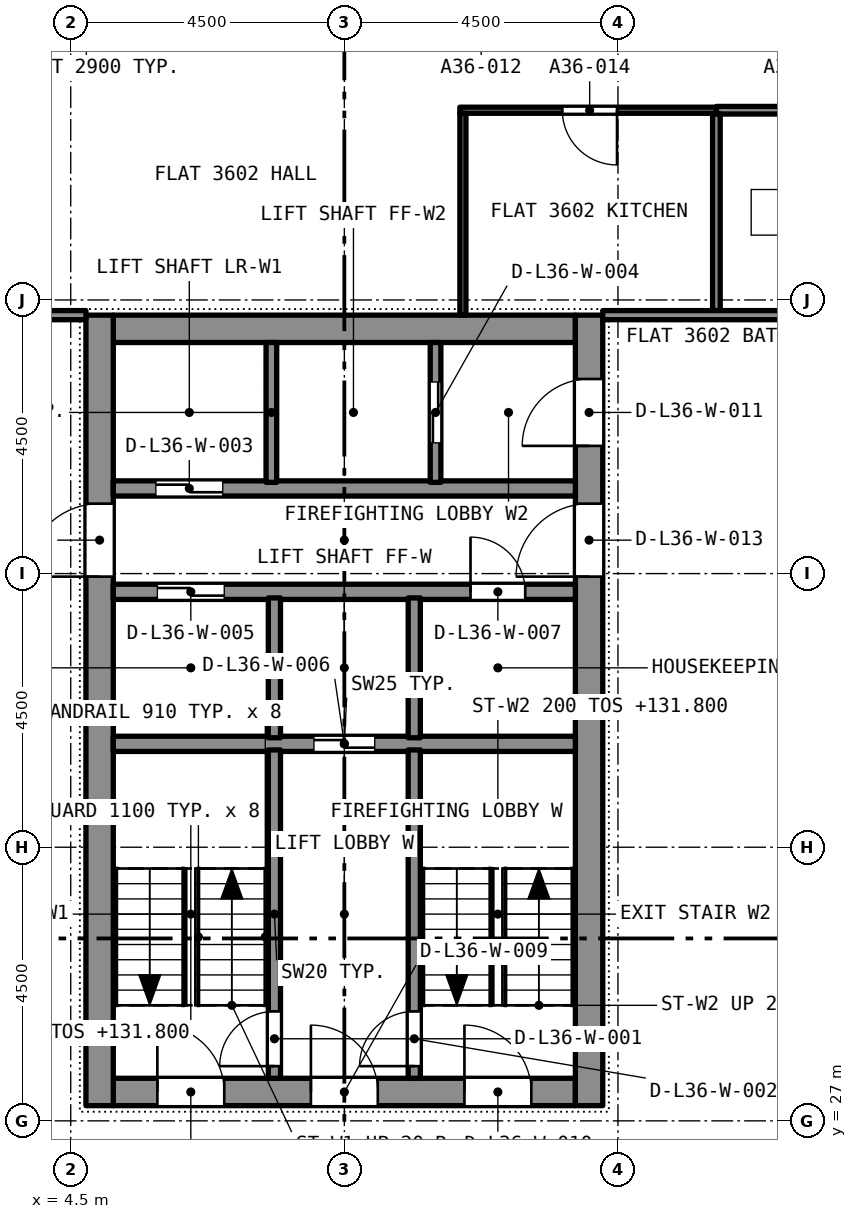
"""IFC4 building model, lengths in metres.
Left out: names, types, materials, properties, quantities, classifications, styles, units other than length and angle.
Written with IfcOpenShell. Run it as: python <this file> out.ifc"""

import sys

from ifc_helpers import new_model, si_unit, direction, frame, frame_2d, origin, place, context, subcontext, project, spatial, rectangle, extrude, element, fill, save


model = new_model("IFC4")
c1 = context("Model", 3, precision=1e-05, world=origin(), true_north=direction((0.0, 1.0)))
c2 = subcontext(c1, "Body", "Model", "MODEL_VIEW")
j1 = project(units=[si_unit("LENGTHUNIT", "METRE"), si_unit("PLANEANGLEUNIT", "RADIAN")], contexts=[c1])
p1 = place(None, origin())
s1 = spatial("IfcSite", under=j1, at=p1, CompositionType="ELEMENT")
p2 = place(p1, origin())
s2 = spatial("IfcBuilding", under=s1, at=p2, CompositionType="ELEMENT")
p3 = place(p2, frame((0.0, 0.0, 130.2)))
s3 = spatial("IfcBuildingStorey", under=s2, at=p3, CompositionType="ELEMENT", Elevation=130.2)
p4 = place(p3, frame((5.2, 27.475, 0.0), z_axis=(0.0, 0.0, 1.0), x_axis=(1.0, 0.0, 0.0)))
e1 = element("IfcWall", 1, at=p4, inside=s3, PredefinedType="SOLIDWALL", context=c2, shape_type="SweptSolid", body=[
    extrude(rectangle(XDim=7.6, YDim=0.45, at=frame_2d((3.8, 0.0))), origin(), (0.0, 0.0, 1.0), 3.2),
])
p5 = place(p4, frame((0.725, 0.0, 0.0)))
e2 = element("IfcOpeningElement", 2, at=p5, cuts=e1, PredefinedType="OPENING", context=c2, shape_type="SweptSolid", body=[
    extrude(rectangle(XDim=1.1, YDim=2.1, at=frame_2d((0.55, 1.05))), frame((0.0, 0.235, 0.0), z_axis=(0.0, -1.0, 0.0), x_axis=(1.0, 0.0, 0.0)), (0.0, 0.0, 1.0), 0.47),
])
p6 = place(p4, frame((3.25, 0.0, 0.0)))
e3 = element("IfcOpeningElement", 3, at=p6, cuts=e1, PredefinedType="OPENING", context=c2, shape_type="SweptSolid", body=[
    extrude(rectangle(XDim=1.1, YDim=2.1, at=frame_2d((0.55, 1.05))), frame((0.0, 0.235, 0.0), z_axis=(0.0, -1.0, 0.0), x_axis=(1.0, 0.0, 0.0)), (0.0, 0.0, 1.0), 0.47),
])
p7 = place(p4, frame((5.775, 0.0, 0.0)))
e4 = element("IfcOpeningElement", 4, at=p7, cuts=e1, PredefinedType="OPENING", context=c2, shape_type="SweptSolid", body=[
    extrude(rectangle(XDim=1.1, YDim=2.1, at=frame_2d((0.55, 1.05))), frame((0.0, 0.235, 0.0), z_axis=(0.0, -1.0, 0.0), x_axis=(1.0, 0.0, 0.0)), (0.0, 0.0, 1.0), 0.47),
])
p8 = place(p3, frame((5.2, 40.025, 0.0), z_axis=(0.0, 0.0, 1.0), x_axis=(1.0, 0.0, 0.0)))
e5 = element("IfcWall", 5, at=p8, inside=s3, PredefinedType="SOLIDWALL", context=c2, shape_type="SweptSolid", body=[
    extrude(rectangle(XDim=7.6, YDim=0.45, at=frame_2d((3.8, 0.0))), origin(), (0.0, 0.0, 1.0), 3.2),
])
p9 = place(p3, frame((4.975, 27.25, 0.0), z_axis=(0.0, 0.0, 1.0), x_axis=(0.0, 1.0, 0.0)))
e6 = element("IfcWall", 6, at=p9, inside=s3, PredefinedType="SOLIDWALL", context=c2, shape_type="SweptSolid", body=[
    extrude(rectangle(XDim=13.0, YDim=0.45, at=frame_2d((6.5, 0.0))), origin(), (0.0, 0.0, 1.0), 3.2),
])
p10 = place(p9, frame((8.7, 0.0, 0.0)))
e7 = element("IfcOpeningElement", 7, at=p10, cuts=e6, PredefinedType="OPENING", context=c2, shape_type="SweptSolid", body=[
    extrude(rectangle(XDim=1.2, YDim=2.1, at=frame_2d((0.6, 1.05))), frame((0.0, 0.235, 0.0), z_axis=(0.0, -1.0, 0.0), x_axis=(1.0, 0.0, 0.0)), (0.0, 0.0, 1.0), 0.47),
])
p11 = place(p3, frame((13.025, 27.25, 0.0), z_axis=(0.0, 0.0, 1.0), x_axis=(0.0, 1.0, 0.0)))
e8 = element("IfcWall", 8, at=p11, inside=s3, PredefinedType="SOLIDWALL", context=c2, shape_type="SweptSolid", body=[
    extrude(rectangle(XDim=13.0, YDim=0.45, at=frame_2d((6.5, 0.0))), origin(), (0.0, 0.0, 1.0), 3.2),
])
p12 = place(p11, frame((10.85, 0.0, 0.0)))
e9 = element("IfcOpeningElement", 9, at=p12, cuts=e8, PredefinedType="OPENING", context=c2, shape_type="SweptSolid", body=[
    extrude(rectangle(XDim=1.1, YDim=2.1, at=frame_2d((0.55, 1.05))), frame((0.0, 0.235, 0.0), z_axis=(0.0, -1.0, 0.0), x_axis=(1.0, 0.0, 0.0)), (0.0, 0.0, 1.0), 0.47),
])
p13 = place(p11, frame((8.7, 0.0, 0.0)))
e10 = element("IfcOpeningElement", 10, at=p13, cuts=e8, PredefinedType="OPENING", context=c2, shape_type="SweptSolid", body=[
    extrude(rectangle(XDim=1.2, YDim=2.1, at=frame_2d((0.6, 1.05))), frame((0.0, 0.235, 0.0), z_axis=(0.0, -1.0, 0.0), x_axis=(1.0, 0.0, 0.0)), (0.0, 0.0, 1.0), 0.47),
])
p14 = place(p3, frame((17.9, 43.62, 0.0), z_axis=(0.0, 0.0, 1.0), x_axis=(-1.0, 0.0, 0.0)))
e11 = element("IfcWall", 11, at=p14, inside=s3, PredefinedType="PARTITIONING", context=c2, shape_type="SweptSolid", body=[
    extrude(rectangle(XDim=2.781, YDim=0.125, at=frame_2d((1.39, 0.0))), origin(), (0.0, 0.0, 1.0), 2.9),
])
p15 = place(p14, frame((0.94, 0.0, 0.0)))
e12 = element("IfcOpeningElement", 12, at=p15, cuts=e11, PredefinedType="OPENING", context=c2, shape_type="SweptSolid", body=[
    extrude(rectangle(XDim=0.8, YDim=2.1, at=frame_2d((0.4, 1.05))), frame((0.0, 0.073, 0.0), z_axis=(0.0, -1.0, 0.0), x_axis=(1.0, 0.0, 0.0)), (0.0, 0.0, 1.0), 0.145),
])
p16 = place(p3, frame((15.119, 40.325, 0.0), z_axis=(0.0, 0.0, 1.0), x_axis=(0.0, 1.0, 0.0)))
e13 = element("IfcWall", 13, at=p16, inside=s3, PredefinedType="PARTITIONING", context=c2, shape_type="SweptSolid", body=[
    extrude(rectangle(XDim=3.233, YDim=0.125, at=frame_2d((1.616, 0.0))), origin(), (0.0, 0.0, 1.0), 2.9),
])
p17 = place(p3, frame((15.119, 43.62, 0.0), z_axis=(0.0, 0.0, 1.0), x_axis=(-1.0, 0.0, 0.0)))
e14 = element("IfcWall", 14, at=p17, inside=s3, PredefinedType="PARTITIONING", context=c2, shape_type="SweptSolid", body=[
    extrude(rectangle(XDim=4.219, YDim=0.1, at=frame_2d((2.11, 0.0))), origin(), (0.0, 0.0, 1.0), 2.9),
])
p18 = place(p17, frame((1.635, 0.0, 0.0)))
e15 = element("IfcOpeningElement", 15, at=p18, cuts=e14, PredefinedType="OPENING", context=c2, shape_type="SweptSolid", body=[
    extrude(rectangle(XDim=0.9, YDim=2.1, at=frame_2d((0.45, 1.05))), frame((0.0, 0.06, 0.0), z_axis=(0.0, -1.0, 0.0), x_axis=(1.0, 0.0, 0.0)), (0.0, 0.0, 1.0), 0.12),
])
p19 = place(p3, frame((10.95, 40.25, 0.0), z_axis=(0.0, 0.0, 1.0), x_axis=(0.0, 1.0, 0.0)))
e16 = element("IfcWall", 16, at=p19, inside=s3, PredefinedType="PARTITIONING", context=c2, shape_type="SweptSolid", body=[
    extrude(rectangle(XDim=3.32, YDim=0.1, at=frame_2d((1.66, 0.0))), origin(), (0.0, 0.0, 1.0), 2.9),
])
p20 = place(p3, frame((0.475, 40.25, 0.0), z_axis=(0.0, 0.0, 1.0), x_axis=(1.0, 0.0, 0.0)))
e17 = element("IfcWall", 17, at=p20, inside=s3, PredefinedType="PARTITIONING", context=c2, shape_type="SweptSolid", body=[
    extrude(rectangle(XDim=4.275, YDim=0.15, at=frame_2d((2.137, 0.0))), origin(), (0.0, 0.0, 1.0), 2.9),
])
p21 = place(p20, frame((1.275, 0.0, 0.0)))
e18 = element("IfcOpeningElement", 18, at=p21, cuts=e17, PredefinedType="OPENING", context=c2, shape_type="SweptSolid", body=[
    extrude(rectangle(XDim=1.0, YDim=2.1, at=frame_2d((0.5, 1.05))), frame((0.0, 0.085, 0.0), z_axis=(0.0, -1.0, 0.0), x_axis=(1.0, 0.0, 0.0)), (0.0, 0.0, 1.0), 0.17),
])
p22 = place(p3, frame((13.25, 40.25, 0.0), z_axis=(0.0, 0.0, 1.0), x_axis=(1.0, 0.0, 0.0)))
e19 = element("IfcWall", 19, at=p22, inside=s3, PredefinedType="PARTITIONING", context=c2, shape_type="SweptSolid", body=[
    extrude(rectangle(XDim=4.275, YDim=0.15, at=frame_2d((2.137, 0.0))), origin(), (0.0, 0.0, 1.0), 2.9),
])
p23 = place(p3, frame((5.2, 33.2, 0.0), z_axis=(0.0, 0.0, 1.0), x_axis=(1.0, 0.0, 0.0)))
e20 = element("IfcWall", 20, at=p23, inside=s3, PredefinedType="SOLIDWALL", context=c2, shape_type="SweptSolid", body=[
    extrude(rectangle(XDim=7.6, YDim=0.25, at=frame_2d((3.8, 0.0))), origin(), (0.0, 0.0, 1.0), 2.9),
])
p24 = place(p23, frame((3.3, 0.0, 0.0)))
e21 = element("IfcOpeningElement", 21, at=p24, cuts=e20, PredefinedType="OPENING", context=c2, shape_type="SweptSolid", body=[
    extrude(rectangle(XDim=1.0, YDim=2.1, at=frame_2d((0.5, 1.05))), frame((0.0, 0.135, 0.0), z_axis=(0.0, -1.0, 0.0), x_axis=(1.0, 0.0, 0.0)), (0.0, 0.0, 1.0), 0.27),
])
p25 = place(p3, frame((5.2, 35.7, 0.0), z_axis=(0.0, 0.0, 1.0), x_axis=(1.0, 0.0, 0.0)))
e22 = element("IfcWall", 22, at=p25, inside=s3, PredefinedType="SOLIDWALL", context=c2, shape_type="SweptSolid", body=[
    extrude(rectangle(XDim=7.6, YDim=0.25, at=frame_2d((3.8, 0.0))), origin(), (0.0, 0.0, 1.0), 2.9),
])
p26 = place(p25, frame((0.725, 0.0, 0.0)))
e23 = element("IfcOpeningElement", 23, at=p26, cuts=e22, PredefinedType="OPENING", context=c2, shape_type="SweptSolid", body=[
    extrude(rectangle(XDim=1.1, YDim=2.4, at=frame_2d((0.55, 1.2))), frame((0.0, 0.135, 0.0), z_axis=(0.0, -1.0, 0.0), x_axis=(1.0, 0.0, 0.0)), (0.0, 0.0, 1.0), 0.27),
])
p27 = place(p25, frame((5.875, 0.0, 0.0)))
e24 = element("IfcOpeningElement", 24, at=p27, cuts=e22, PredefinedType="OPENING", context=c2, shape_type="SweptSolid", body=[
    extrude(rectangle(XDim=0.9, YDim=2.1, at=frame_2d((0.45, 1.05))), frame((0.0, 0.135, 0.0), z_axis=(0.0, -1.0, 0.0), x_axis=(1.0, 0.0, 0.0)), (0.0, 0.0, 1.0), 0.27),
])
p28 = place(p3, frame((5.2, 37.4, 0.0), z_axis=(0.0, 0.0, 1.0), x_axis=(1.0, 0.0, 0.0)))
e25 = element("IfcWall", 25, at=p28, inside=s3, PredefinedType="SOLIDWALL", context=c2, shape_type="SweptSolid", body=[
    extrude(rectangle(XDim=7.6, YDim=0.25, at=frame_2d((3.8, 0.0))), origin(), (0.0, 0.0, 1.0), 2.9),
])
p29 = place(p28, frame((0.7, 0.0, 0.0)))
e26 = element("IfcOpeningElement", 26, at=p29, cuts=e25, PredefinedType="OPENING", context=c2, shape_type="SweptSolid", body=[
    extrude(rectangle(XDim=1.1, YDim=2.4, at=frame_2d((0.55, 1.2))), frame((0.0, 0.135, 0.0), z_axis=(0.0, -1.0, 0.0), x_axis=(1.0, 0.0, 0.0)), (0.0, 0.0, 1.0), 0.27),
])
p30 = place(p3, frame((7.85, 27.7, 0.0), z_axis=(0.0, 0.0, 1.0), x_axis=(0.0, 1.0, 0.0)))
e27 = element("IfcWall", 27, at=p30, inside=s3, PredefinedType="SOLIDWALL", context=c2, shape_type="SweptSolid", body=[
    extrude(rectangle(XDim=5.4, YDim=0.2, at=frame_2d((2.7, 0.0))), origin(), (0.0, 0.0, 1.0), 2.9),
])
p31 = place(p30, frame((0.2, 0.0, 0.0)))
e28 = element("IfcOpeningElement", 28, at=p31, cuts=e27, PredefinedType="OPENING", context=c2, shape_type="SweptSolid", body=[
    extrude(rectangle(XDim=0.9, YDim=2.1, at=frame_2d((0.45, 1.05))), frame((0.0, 0.11, 0.0), z_axis=(0.0, -1.0, 0.0), x_axis=(1.0, 0.0, 0.0)), (0.0, 0.0, 1.0), 0.22),
])
p32 = place(p3, frame((10.15, 27.7, 0.0), z_axis=(0.0, 0.0, 1.0), x_axis=(0.0, 1.0, 0.0)))
e29 = element("IfcWall", 29, at=p32, inside=s3, PredefinedType="SOLIDWALL", context=c2, shape_type="SweptSolid", body=[
    extrude(rectangle(XDim=5.4, YDim=0.2, at=frame_2d((2.7, 0.0))), origin(), (0.0, 0.0, 1.0), 2.9),
])
p33 = place(p32, frame((0.2, 0.0, 0.0)))
e30 = element("IfcOpeningElement", 30, at=p33, cuts=e29, PredefinedType="OPENING", context=c2, shape_type="SweptSolid", body=[
    extrude(rectangle(XDim=0.9, YDim=2.1, at=frame_2d((0.45, 1.05))), frame((0.0, 0.11, 0.0), z_axis=(0.0, -1.0, 0.0), x_axis=(1.0, 0.0, 0.0)), (0.0, 0.0, 1.0), 0.22),
])
for number, where, z_axis, x_axis in (
    (31, (7.85, 33.3, 0.0), (0.0, 0.0, 1.0), (0.0, 1.0, 0.0)),
    (32, (10.15, 33.3, 0.0), (0.0, 0.0, 1.0), (0.0, 1.0, 0.0)),
):
    element("IfcWall", number, at=place(p3, frame(where, z_axis=z_axis, x_axis=x_axis)), inside=s3, PredefinedType="SOLIDWALL", context=c2, shape_type="SweptSolid", body=[
        extrude(rectangle(XDim=2.3, YDim=0.2, at=frame_2d((1.15, 0.0))), origin(), (0.0, 0.0, 1.0), 2.9),
    ])
p34 = place(p3, frame((7.8, 37.5, 0.0), z_axis=(0.0, 0.0, 1.0), x_axis=(0.0, 1.0, 0.0)))
e33 = element("IfcWall", 33, at=p34, inside=s3, PredefinedType="SOLIDWALL", context=c2, shape_type="SweptSolid", body=[
    extrude(rectangle(XDim=2.3, YDim=0.175, at=frame_2d((1.15, 0.0))), origin(), (0.0, 0.0, 1.0), 2.9),
])
p35 = place(p3, frame((10.5, 37.5, 0.0), z_axis=(0.0, 0.0, 1.0), x_axis=(0.0, 1.0, 0.0)))
e34 = element("IfcWall", 34, at=p35, inside=s3, PredefinedType="SOLIDWALL", context=c2, shape_type="SweptSolid", body=[
    extrude(rectangle(XDim=2.3, YDim=0.175, at=frame_2d((1.15, 0.0))), origin(), (0.0, 0.0, 1.0), 2.9),
])
p36 = place(p35, frame((0.65, 0.0, 0.0)))
e35 = element("IfcOpeningElement", 35, at=p36, cuts=e34, PredefinedType="OPENING", context=c2, shape_type="SweptSolid", body=[
    extrude(rectangle(XDim=1.0, YDim=2.1, at=frame_2d((0.5, 1.05))), frame((0.0, 0.097, 0.0), z_axis=(0.0, -1.0, 0.0), x_axis=(1.0, 0.0, 0.0)), (0.0, 0.0, 1.0), 0.195),
])
p37 = place(p18, origin())
e36 = element("IfcDoor", 36, at=p37, inside=s3, OperationType="SINGLE_SWING_LEFT", PredefinedType="DOOR", context=c2, shape_type="SweptSolid", body=[
    extrude(rectangle(XDim=0.9, YDim=2.1, at=frame_2d((0.45, 1.05))), frame((0.0, 0.025, 0.0), z_axis=(0.0, -1.0, 0.0), x_axis=(1.0, 0.0, 0.0)), (0.0, 0.0, 1.0), 0.05),
])
fill(e15, e36)
p38 = place(p31, origin())
e37 = element("IfcDoor", 37, at=p38, inside=s3, OperationType="SINGLE_SWING_LEFT", PredefinedType="DOOR", context=c2, shape_type="SweptSolid", body=[
    extrude(rectangle(XDim=0.9, YDim=2.1, at=frame_2d((0.45, 1.05))), frame((0.0, 0.025, 0.0), z_axis=(0.0, -1.0, 0.0), x_axis=(1.0, 0.0, 0.0)), (0.0, 0.0, 1.0), 0.05),
])
fill(e28, e37)
p39 = place(p33, origin())
e38 = element("IfcDoor", 38, at=p39, inside=s3, OperationType="SINGLE_SWING_LEFT", PredefinedType="DOOR", context=c2, shape_type="SweptSolid", body=[
    extrude(rectangle(XDim=0.9, YDim=2.1, at=frame_2d((0.45, 1.05))), frame((0.0, 0.025, 0.0), z_axis=(0.0, -1.0, 0.0), x_axis=(1.0, 0.0, 0.0)), (0.0, 0.0, 1.0), 0.05),
])
fill(e30, e38)
p40 = place(p29, origin())
e39 = element("IfcDoor", 39, at=p40, inside=s3, OperationType="SLIDING_TO_LEFT", PredefinedType="DOOR", context=c2, shape_type="SweptSolid", body=[
    extrude(rectangle(XDim=1.1, YDim=2.4, at=frame_2d((0.55, 1.2))), frame((0.0, 0.025, 0.0), z_axis=(0.0, -1.0, 0.0), x_axis=(1.0, 0.0, 0.0)), (0.0, 0.0, 1.0), 0.05),
])
fill(e26, e39)
p41 = place(p36, origin())
e40 = element("IfcDoor", 40, at=p41, inside=s3, OperationType="SLIDING_TO_LEFT", PredefinedType="DOOR", context=c2, shape_type="SweptSolid", body=[
    extrude(rectangle(XDim=1.0, YDim=2.1, at=frame_2d((0.5, 1.05))), frame((0.0, 0.025, 0.0), z_axis=(0.0, -1.0, 0.0), x_axis=(1.0, 0.0, 0.0)), (0.0, 0.0, 1.0), 0.05),
])
fill(e35, e40)
p42 = place(p26, origin())
e41 = element("IfcDoor", 41, at=p42, inside=s3, OperationType="SLIDING_TO_LEFT", PredefinedType="DOOR", context=c2, shape_type="SweptSolid", body=[
    extrude(rectangle(XDim=1.1, YDim=2.4, at=frame_2d((0.55, 1.2))), frame((0.0, 0.025, 0.0), z_axis=(0.0, -1.0, 0.0), x_axis=(1.0, 0.0, 0.0)), (0.0, 0.0, 1.0), 0.05),
])
fill(e23, e41)
p43 = place(p24, origin())
e42 = element("IfcDoor", 42, at=p43, inside=s3, OperationType="SLIDING_TO_LEFT", PredefinedType="DOOR", context=c2, shape_type="SweptSolid", body=[
    extrude(rectangle(XDim=1.0, YDim=2.1, at=frame_2d((0.5, 1.05))), frame((0.0, 0.025, 0.0), z_axis=(0.0, -1.0, 0.0), x_axis=(1.0, 0.0, 0.0)), (0.0, 0.0, 1.0), 0.05),
])
fill(e21, e42)
p44 = place(p27, origin())
e43 = element("IfcDoor", 43, at=p44, inside=s3, OperationType="SINGLE_SWING_LEFT", PredefinedType="DOOR", context=c2, shape_type="SweptSolid", body=[
    extrude(rectangle(XDim=0.9, YDim=2.1, at=frame_2d((0.45, 1.05))), frame((0.0, 0.025, 0.0), z_axis=(0.0, -1.0, 0.0), x_axis=(1.0, 0.0, 0.0)), (0.0, 0.0, 1.0), 0.05),
])
fill(e24, e43)
p45 = place(p5, origin())
e44 = element("IfcDoor", 44, at=p45, inside=s3, OperationType="SINGLE_SWING_LEFT", PredefinedType="DOOR", context=c2, shape_type="SweptSolid", body=[
    extrude(rectangle(XDim=1.1, YDim=2.1, at=frame_2d((0.55, 1.05))), frame((0.0, 0.025, 0.0), z_axis=(0.0, -1.0, 0.0), x_axis=(1.0, 0.0, 0.0)), (0.0, 0.0, 1.0), 0.05),
])
fill(e2, e44)
p46 = place(p6, origin())
e45 = element("IfcDoor", 45, at=p46, inside=s3, OperationType="SINGLE_SWING_LEFT", PredefinedType="DOOR", context=c2, shape_type="SweptSolid", body=[
    extrude(rectangle(XDim=1.1, YDim=2.1, at=frame_2d((0.55, 1.05))), frame((0.0, 0.025, 0.0), z_axis=(0.0, -1.0, 0.0), x_axis=(1.0, 0.0, 0.0)), (0.0, 0.0, 1.0), 0.05),
])
fill(e3, e45)
p47 = place(p7, origin())
e46 = element("IfcDoor", 46, at=p47, inside=s3, OperationType="SINGLE_SWING_LEFT", PredefinedType="DOOR", context=c2, shape_type="SweptSolid", body=[
    extrude(rectangle(XDim=1.1, YDim=2.1, at=frame_2d((0.55, 1.05))), frame((0.0, 0.025, 0.0), z_axis=(0.0, -1.0, 0.0), x_axis=(1.0, 0.0, 0.0)), (0.0, 0.0, 1.0), 0.05),
])
fill(e4, e46)
p48 = place(p12, origin())
e47 = element("IfcDoor", 47, at=p48, inside=s3, OperationType="SINGLE_SWING_LEFT", PredefinedType="DOOR", context=c2, shape_type="SweptSolid", body=[
    extrude(rectangle(XDim=1.1, YDim=2.1, at=frame_2d((0.55, 1.05))), frame((0.0, 0.025, 0.0), z_axis=(0.0, -1.0, 0.0), x_axis=(1.0, 0.0, 0.0)), (0.0, 0.0, 1.0), 0.05),
])
fill(e9, e47)
p49 = place(p10, origin())
e48 = element("IfcDoor", 48, at=p49, inside=s3, OperationType="SINGLE_SWING_LEFT", PredefinedType="DOOR", context=c2, shape_type="SweptSolid", body=[
    extrude(rectangle(XDim=1.2, YDim=2.1, at=frame_2d((0.6, 1.05))), frame((0.0, 0.025, 0.0), z_axis=(0.0, -1.0, 0.0), x_axis=(1.0, 0.0, 0.0)), (0.0, 0.0, 1.0), 0.05),
])
fill(e7, e48)
p50 = place(p13, origin())
e49 = element("IfcDoor", 49, at=p50, inside=s3, OperationType="SINGLE_SWING_LEFT", PredefinedType="DOOR", context=c2, shape_type="SweptSolid", body=[
    extrude(rectangle(XDim=1.2, YDim=2.1, at=frame_2d((0.6, 1.05))), frame((0.0, 0.025, 0.0), z_axis=(0.0, -1.0, 0.0), x_axis=(1.0, 0.0, 0.0)), (0.0, 0.0, 1.0), 0.05),
])
fill(e10, e49)
save(model, sys.argv[1])
